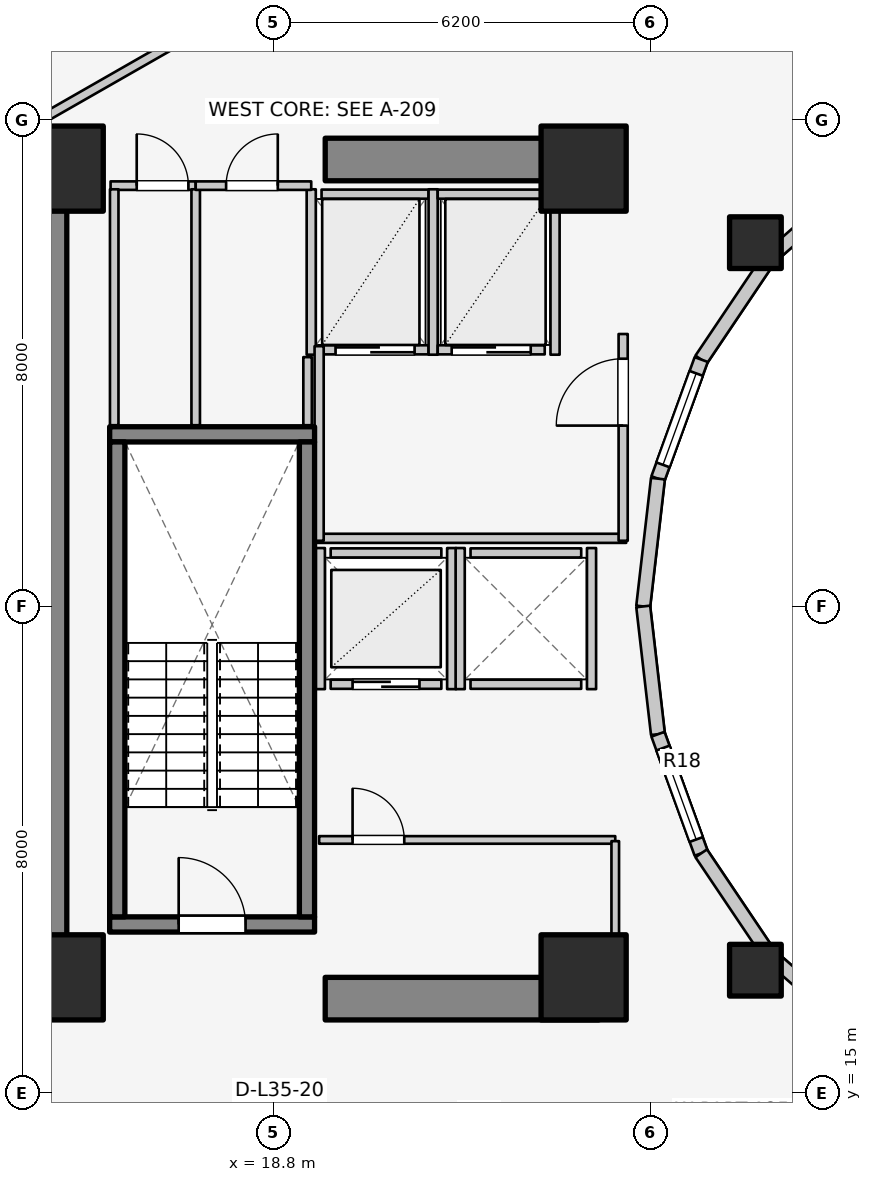
"""IFC4 building model, lengths in metres.
Left out: names, types, materials, properties, quantities, classifications, styles, units other than length and angle.
Written with IfcOpenShell. Run it as: python <this file> out.ifc"""

import sys

from ifc_helpers import new_model, si_unit, direction, frame, frame_2d, origin, origin_2d, place, context, subcontext, project, spatial, rectangle, extrude, element, fill, save


model = new_model("IFC4")
c1 = context("Model", 3, precision=1e-05, world=origin(), true_north=direction((0.0, 1.0)))
c2 = subcontext(c1, "Body", "Model", "MODEL_VIEW")
j1 = project(units=[si_unit("LENGTHUNIT", "METRE"), si_unit("PLANEANGLEUNIT", "RADIAN")], contexts=[c1])
p1 = place(None, origin())
s1 = spatial("IfcSite", under=j1, at=p1, CompositionType="ELEMENT")
p2 = place(p1, origin())
s2 = spatial("IfcBuilding", under=s1, at=p2, CompositionType="ELEMENT")
p3 = place(p2, frame((0.0, 0.0, 116.6)))
s3 = spatial("IfcBuildingStorey", under=s2, at=p3, CompositionType="ELEMENT", Elevation=116.6)
p4 = place(p3, frame((15.05, 17.05, 0.0), z_axis=(0.0, 0.0, 1.0), x_axis=(0.0, 1.0, 0.0)))
e1 = element("IfcWall", 1, at=p4, inside=s3, PredefinedType="SHEAR", context=c2, shape_type="SweptSolid", body=[
    extrude(rectangle(XDim=12.8, YDim=0.7, at=frame_2d((6.4, 0.0))), origin(), (0.0, 0.0, 1.0), 3.1),
])
for number, where, z_axis, x_axis in (
    (2, (19.65, 16.55, 0.0), (0.0, 0.0, 1.0), (1.0, 0.0, 0.0)),
    (3, (19.65, 30.35, 0.0), (0.0, 0.0, 1.0), (1.0, 0.0, 0.0)),
):
    element("IfcWall", number, at=place(p3, frame(where, z_axis=z_axis, x_axis=x_axis)), inside=s3, PredefinedType="SHEAR", context=c2, shape_type="SweptSolid", body=[
        extrude(rectangle(XDim=4.5, YDim=0.7, at=frame_2d((2.25, 0.0))), origin(), (0.0, 0.0, 1.0), 3.1),
    ])
p5 = place(p3, frame((16.105, 17.77, 0.0), z_axis=(0.0, 0.0, 1.0), x_axis=(1.0, 0.0, 0.0)))
e4 = element("IfcWall", 4, at=p5, inside=s3, PredefinedType="SOLIDWALL", context=c2, shape_type="SweptSolid", body=[
    extrude(rectangle(XDim=3.37, YDim=0.25, at=frame_2d((1.685, 0.0))), origin(), (0.0, 0.0, 1.0), 3.1),
])
p6 = place(p5, frame((1.135, 0.0, 0.0)))
e5 = element("IfcOpeningElement", 5, at=p6, cuts=e4, PredefinedType="OPENING", context=c2, shape_type="SweptSolid", body=[
    extrude(rectangle(XDim=1.1, YDim=2.1, at=frame_2d((0.55, 1.05))), frame((0.0, 0.135, 0.0), z_axis=(0.0, -1.0, 0.0), x_axis=(1.0, 0.0, 0.0)), (0.0, 0.0, 1.0), 0.27),
])
p7 = place(p3, frame((16.105, 25.83, 0.0), z_axis=(0.0, 0.0, 1.0), x_axis=(1.0, 0.0, 0.0)))
e6 = element("IfcWall", 6, at=p7, inside=s3, PredefinedType="SOLIDWALL", context=c2, shape_type="SweptSolid", body=[
    extrude(rectangle(XDim=3.37, YDim=0.25, at=frame_2d((1.685, 0.0))), origin(), (0.0, 0.0, 1.0), 3.1),
])
for number, where, z_axis, x_axis in (
    (7, (16.23, 17.895, 0.0), (0.0, 0.0, 1.0), (0.0, 1.0, 0.0)),
    (8, (19.35, 17.895, 0.0), (0.0, 0.0, 1.0), (0.0, 1.0, 0.0)),
):
    element("IfcWall", number, at=place(p3, frame(where, z_axis=z_axis, x_axis=x_axis)), inside=s3, PredefinedType="SOLIDWALL", context=c2, shape_type="SweptSolid", body=[
        extrude(rectangle(XDim=7.81, YDim=0.25, at=frame_2d((3.905, 0.0))), origin(), (0.0, 0.0, 1.0), 3.1),
    ])
for number, where, z_axis, x_axis in (
    (9, (15.3, 16.9, 0.0), (0.0, 0.0, 1.0), (1.0, 0.0, 0.0)),
    (10, (23.9, 16.9, 0.0), (0.0, 0.0, 1.0), (1.0, 0.0, 0.0)),
    (11, (23.9, 30.2, 0.0), (0.0, 0.0, 1.0), (1.0, 0.0, 0.0)),
    (12, (15.3, 30.2, 0.0), (0.0, 0.0, 1.0), (1.0, 0.0, 0.0)),
):
    element("IfcColumn", number, at=place(p3, frame(where, z_axis=z_axis, x_axis=x_axis)), inside=s3, PredefinedType="COLUMN", context=c2, shape_type="SweptSolid", body=[
        extrude(rectangle(XDim=1.4, YDim=1.4, at=origin_2d()), origin(), (0.0, 0.0, 1.0), 3.1),
    ])
for number, where, z_axis, x_axis in (
    (13, (26.725, 28.982, 0.0), (0.0, 0.0, 1.0), (1.0, 0.0, 0.0)),
    (14, (26.725, 17.018, 0.0), (0.0, 0.0, 1.0), (1.0, 0.0, 0.0)),
):
    element("IfcColumn", number, at=place(p3, frame(where, z_axis=z_axis, x_axis=x_axis)), inside=s3, PredefinedType="COLUMN", context=c2, shape_type="SweptSolid", body=[
        extrude(rectangle(XDim=0.85, YDim=0.85, at=origin_2d()), origin(), (0.0, 0.0, 1.0), 3.1),
    ])
p8 = place(p3, frame((28.44, 30.032, 0.0), z_axis=(0.0, 0.0, 1.0), x_axis=(-0.752576694707, -0.658504607869, 0.0)))
e15 = element("IfcWall", 15, at=p8, inside=s3, PredefinedType="STANDARD", context=c2, shape_type="SweptSolid", body=[
    extrude(rectangle(XDim=1.959, YDim=0.23, at=frame_2d((0.98, 0.0))), origin(), (0.0, 0.0, 1.0), 2.16),
])
p9 = place(p3, frame((26.965, 28.742, 0.0), z_axis=(0.0, 0.0, 1.0), x_axis=(-0.558197800898, -0.829707909492, 0.0)))
e16 = element("IfcWall", 16, at=p9, inside=s3, PredefinedType="STANDARD", context=c2, shape_type="SweptSolid", body=[
    extrude(rectangle(XDim=2.027, YDim=0.23, at=frame_2d((1.013, 0.0))), origin(), (0.0, 0.0, 1.0), 2.16),
])
p10 = place(p3, frame((25.834, 27.06, 0.0), z_axis=(0.0, 0.0, 1.0), x_axis=(-0.341423187295, -0.93990968033, 0.0)))
e17 = element("IfcWall", 17, at=p10, inside=s3, PredefinedType="STANDARD", context=c2, shape_type="SweptSolid", body=[
    extrude(rectangle(XDim=2.084, YDim=0.23, at=frame_2d((1.042, 0.0))), origin(), (0.0, 0.0, 1.0), 2.84),
])
p11 = place(p10, frame((0.242, 0.0, 0.85)))
e18 = element("IfcOpeningElement", 18, at=p11, cuts=e17, PredefinedType="OPENING", context=c2, shape_type="SweptSolid", body=[
    extrude(rectangle(XDim=1.6, YDim=1.65, at=frame_2d((0.8, 0.825))), frame((0.0, 0.125, 0.0), z_axis=(0.0, -1.0, 0.0), x_axis=(1.0, 0.0, 0.0)), (0.0, 0.0, 1.0), 0.25),
])
for number, where, z_axis, x_axis in (
    (19, (25.123, 25.102, 0.0), (0.0, 0.0, 1.0), (-0.115, -0.993, 0.0)),
    (20, (24.88, 23.0, 0.0), (0.0, 0.0, 1.0), (0.115, -0.993, 0.0)),
):
    element("IfcWall", number, at=place(p3, frame(where, z_axis=z_axis, x_axis=x_axis)), inside=s3, PredefinedType="STANDARD", context=c2, shape_type="SweptSolid", body=[
        extrude(rectangle(XDim=2.115, YDim=0.23, at=frame_2d((1.058, 0.0))), origin(), (0.0, 0.0, 1.0), 2.84),
    ])
p12 = place(p3, frame((25.123, 20.898, 0.0), z_axis=(0.0, 0.0, 1.0), x_axis=(0.341423187295, -0.93990968033, 0.0)))
e21 = element("IfcWall", 21, at=p12, inside=s3, PredefinedType="STANDARD", context=c2, shape_type="SweptSolid", body=[
    extrude(rectangle(XDim=2.084, YDim=0.23, at=frame_2d((1.042, 0.0))), origin(), (0.0, 0.0, 1.0), 2.84),
])
p13 = place(p12, frame((0.242, 0.0, 0.85)))
e22 = element("IfcOpeningElement", 22, at=p13, cuts=e21, PredefinedType="OPENING", context=c2, shape_type="SweptSolid", body=[
    extrude(rectangle(XDim=1.6, YDim=1.65, at=frame_2d((0.8, 0.825))), frame((0.0, 0.125, 0.0), z_axis=(0.0, -1.0, 0.0), x_axis=(1.0, 0.0, 0.0)), (0.0, 0.0, 1.0), 0.25),
])
p14 = place(p3, frame((25.834, 18.94, 0.0), z_axis=(0.0, 0.0, 1.0), x_axis=(0.558197800898, -0.829707909492, 0.0)))
e23 = element("IfcWall", 23, at=p14, inside=s3, PredefinedType="STANDARD", context=c2, shape_type="SweptSolid", body=[
    extrude(rectangle(XDim=2.027, YDim=0.23, at=frame_2d((1.013, 0.0))), origin(), (0.0, 0.0, 1.0), 2.16),
])
p15 = place(p3, frame((26.965, 17.258, 0.0), z_axis=(0.0, 0.0, 1.0), x_axis=(0.752576694707, -0.658504607869, 0.0)))
e24 = element("IfcWall", 24, at=p15, inside=s3, PredefinedType="STANDARD", context=c2, shape_type="SweptSolid", body=[
    extrude(rectangle(XDim=1.959, YDim=0.23, at=frame_2d((0.98, 0.0))), origin(), (0.0, 0.0, 1.0), 2.16),
])
p16 = place(p3, frame((19.74, 21.72, 0.0), z_axis=(0.0, 0.0, 1.0), x_axis=(1.0, 0.0, 0.0)))
e25 = element("IfcWall", 25, at=p16, inside=s3, PredefinedType="SOLIDWALL", context=c2, shape_type="SweptSolid", body=[
    extrude(rectangle(XDim=1.82, YDim=0.15, at=frame_2d((0.91, 0.0))), origin(), (0.0, 0.0, 1.0), 2.855),
])
p17 = place(p16, frame((0.36, 0.0, 0.0)))
e26 = element("IfcOpeningElement", 26, at=p17, cuts=e25, PredefinedType="OPENING", context=c2, shape_type="SweptSolid", body=[
    extrude(rectangle(XDim=1.1, YDim=2.1, at=frame_2d((0.55, 1.05))), frame((0.0, 0.085, 0.0), z_axis=(0.0, -1.0, 0.0), x_axis=(1.0, 0.0, 0.0)), (0.0, 0.0, 1.0), 0.17),
])
p18 = place(p3, frame((19.74, 23.88, 0.0), z_axis=(0.0, 0.0, 1.0), x_axis=(1.0, 0.0, 0.0)))
e27 = element("IfcWall", 27, at=p18, inside=s3, PredefinedType="SOLIDWALL", context=c2, shape_type="SweptSolid", body=[
    extrude(rectangle(XDim=1.82, YDim=0.15, at=frame_2d((0.91, 0.0))), origin(), (0.0, 0.0, 1.0), 2.855),
])
for number, where, z_axis, x_axis in (
    (28, (19.57, 21.64, 0.0), (0.0, 0.0, 1.0), (0.0, 1.0, 0.0)),
    (29, (21.73, 21.64, 0.0), (0.0, 0.0, 1.0), (0.0, 1.0, 0.0)),
):
    element("IfcWall", number, at=place(p3, frame(where, z_axis=z_axis, x_axis=x_axis)), inside=s3, PredefinedType="SOLIDWALL", context=c2, shape_type="SweptSolid", body=[
        extrude(rectangle(XDim=2.32, YDim=0.15, at=frame_2d((1.16, 0.0))), origin(), (0.0, 0.0, 1.0), 2.855),
    ])
for number, where, z_axis, x_axis in (
    (30, (22.04, 21.72, 0.0), (0.0, 0.0, 1.0), (1.0, 0.0, 0.0)),
    (31, (22.04, 23.88, 0.0), (0.0, 0.0, 1.0), (1.0, 0.0, 0.0)),
):
    element("IfcWall", number, at=place(p3, frame(where, z_axis=z_axis, x_axis=x_axis)), inside=s3, PredefinedType="SOLIDWALL", context=c2, shape_type="SweptSolid", body=[
        extrude(rectangle(XDim=1.82, YDim=0.15, at=frame_2d((0.91, 0.0))), origin(), (0.0, 0.0, 1.0), 2.12),
    ])
p19 = place(p3, frame((21.87, 21.64, 0.0), z_axis=(0.0, 0.0, 1.0), x_axis=(0.0, 1.0, 0.0)))
e32 = element("IfcWall", 32, at=p19, inside=s3, PredefinedType="SOLIDWALL", context=c2, shape_type="SweptSolid", body=[
    extrude(rectangle(XDim=2.32, YDim=0.15, at=frame_2d((1.16, 0.0))), origin(), (0.0, 0.0, 1.0), 2.855),
])
p20 = place(p3, frame((24.03, 21.64, 0.0), z_axis=(0.0, 0.0, 1.0), x_axis=(0.0, 1.0, 0.0)))
e33 = element("IfcWall", 33, at=p20, inside=s3, PredefinedType="SOLIDWALL", context=c2, shape_type="SweptSolid", body=[
    extrude(rectangle(XDim=2.32, YDim=0.15, at=frame_2d((1.16, 0.0))), origin(), (0.0, 0.0, 1.0), 2.12),
])
p21 = place(p3, frame((19.59, 27.22, 0.0), z_axis=(0.0, 0.0, 1.0), x_axis=(1.0, 0.0, 0.0)))
e34 = element("IfcWall", 34, at=p21, inside=s3, PredefinedType="SOLIDWALL", context=c2, shape_type="SweptSolid", body=[
    extrude(rectangle(XDim=1.76, YDim=0.15, at=frame_2d((0.88, 0.0))), origin(), (0.0, 0.0, 1.0), 2.855),
])
p22 = place(p21, frame((0.23, 0.0, 0.0)))
e35 = element("IfcOpeningElement", 35, at=p22, cuts=e34, PredefinedType="OPENING", context=c2, shape_type="SweptSolid", body=[
    extrude(rectangle(XDim=1.3, YDim=2.1, at=frame_2d((0.65, 1.05))), frame((0.0, 0.085, 0.0), z_axis=(0.0, -1.0, 0.0), x_axis=(1.0, 0.0, 0.0)), (0.0, 0.0, 1.0), 0.17),
])
p23 = place(p3, frame((19.59, 29.78, 0.0), z_axis=(0.0, 0.0, 1.0), x_axis=(1.0, 0.0, 0.0)))
e36 = element("IfcWall", 36, at=p23, inside=s3, PredefinedType="SOLIDWALL", context=c2, shape_type="SweptSolid", body=[
    extrude(rectangle(XDim=1.76, YDim=0.15, at=frame_2d((0.88, 0.0))), origin(), (0.0, 0.0, 1.0), 2.855),
])
for number, where, z_axis, x_axis in (
    (37, (19.42, 27.14, 0.0), (0.0, 0.0, 1.0), (0.0, 1.0, 0.0)),
    (38, (21.425, 27.14, 0.0), (0.0, 0.0, 1.0), (0.0, 1.0, 0.0)),
):
    element("IfcWall", number, at=place(p3, frame(where, z_axis=z_axis, x_axis=x_axis)), inside=s3, PredefinedType="SOLIDWALL", context=c2, shape_type="SweptSolid", body=[
        extrude(rectangle(XDim=2.72, YDim=0.15, at=frame_2d((1.36, 0.0))), origin(), (0.0, 0.0, 1.0), 2.855),
    ])
p24 = place(p3, frame((21.5, 27.22, 0.0), z_axis=(0.0, 0.0, 1.0), x_axis=(1.0, 0.0, 0.0)))
e39 = element("IfcWall", 39, at=p24, inside=s3, PredefinedType="SOLIDWALL", context=c2, shape_type="SweptSolid", body=[
    extrude(rectangle(XDim=1.76, YDim=0.15, at=frame_2d((0.88, 0.0))), origin(), (0.0, 0.0, 1.0), 2.855),
])
p25 = place(p24, frame((0.23, 0.0, 0.0)))
e40 = element("IfcOpeningElement", 40, at=p25, cuts=e39, PredefinedType="OPENING", context=c2, shape_type="SweptSolid", body=[
    extrude(rectangle(XDim=1.3, YDim=2.1, at=frame_2d((0.65, 1.05))), frame((0.0, 0.085, 0.0), z_axis=(0.0, -1.0, 0.0), x_axis=(1.0, 0.0, 0.0)), (0.0, 0.0, 1.0), 0.17),
])
p26 = place(p3, frame((21.5, 29.78, 0.0), z_axis=(0.0, 0.0, 1.0), x_axis=(1.0, 0.0, 0.0)))
e41 = element("IfcWall", 41, at=p26, inside=s3, PredefinedType="SOLIDWALL", context=c2, shape_type="SweptSolid", body=[
    extrude(rectangle(XDim=1.76, YDim=0.15, at=frame_2d((0.88, 0.0))), origin(), (0.0, 0.0, 1.0), 2.855),
])
p27 = place(p3, frame((23.43, 27.14, 0.0), z_axis=(0.0, 0.0, 1.0), x_axis=(0.0, 1.0, 0.0)))
e42 = element("IfcWall", 42, at=p27, inside=s3, PredefinedType="SOLIDWALL", context=c2, shape_type="SweptSolid", body=[
    extrude(rectangle(XDim=2.72, YDim=0.15, at=frame_2d((1.36, 0.0))), origin(), (0.0, 0.0, 1.0), 2.855),
])
p28 = place(p3, frame((19.52, 24.12, 0.0), z_axis=(0.0, 0.0, 1.0), x_axis=(1.0, 0.0, 0.0)))
e43 = element("IfcWall", 43, at=p28, inside=s3, PredefinedType="PARTITIONING", context=c2, shape_type="SweptSolid", body=[
    extrude(rectangle(XDim=5.08, YDim=0.15, at=frame_2d((2.54, 0.0))), origin(), (0.0, 0.0, 1.0), 2.12),
])
p29 = place(p3, frame((19.55, 24.08, 0.0), z_axis=(0.0, 0.0, 1.0), x_axis=(0.0, 1.0, 0.0)))
e44 = element("IfcWall", 44, at=p29, inside=s3, PredefinedType="PARTITIONING", context=c2, shape_type="SweptSolid", body=[
    extrude(rectangle(XDim=3.2, YDim=0.15, at=frame_2d((1.6, 0.0))), origin(), (0.0, 0.0, 1.0), 2.855),
])
p30 = place(p3, frame((24.55, 24.08, 0.0), z_axis=(0.0, 0.0, 1.0), x_axis=(0.0, 1.0, 0.0)))
e45 = element("IfcWall", 45, at=p30, inside=s3, PredefinedType="PARTITIONING", context=c2, shape_type="SweptSolid", body=[
    extrude(rectangle(XDim=3.4, YDim=0.15, at=frame_2d((1.7, 0.0))), origin(), (0.0, 0.0, 1.0), 2.855),
])
p31 = place(p30, frame((1.894, 0.0, 0.0)))
e46 = element("IfcOpeningElement", 46, at=p31, cuts=e45, PredefinedType="OPENING", context=c2, shape_type="SweptSolid", body=[
    extrude(rectangle(XDim=1.1, YDim=2.1, at=frame_2d((0.55, 1.05))), frame((0.0, 0.085, 0.0), z_axis=(0.0, -1.0, 0.0), x_axis=(1.0, 0.0, 0.0)), (0.0, 0.0, 1.0), 0.17),
])
p32 = place(p3, frame((19.55, 19.16, 0.0), z_axis=(0.0, 0.0, 1.0), x_axis=(1.0, 0.0, 0.0)))
e47 = element("IfcWall", 47, at=p32, inside=s3, PredefinedType="PARTITIONING", context=c2, shape_type="SweptSolid", body=[
    extrude(rectangle(XDim=4.87, YDim=0.125, at=frame_2d((2.435, 0.0))), origin(), (0.0, 0.0, 1.0), 2.12),
])
p33 = place(p32, frame((0.55, 0.0, 0.0)))
e48 = element("IfcOpeningElement", 48, at=p33, cuts=e47, PredefinedType="OPENING", context=c2, shape_type="SweptSolid", body=[
    extrude(rectangle(XDim=0.85, YDim=2.05, at=frame_2d((0.425, 1.025))), frame((0.0, 0.073, 0.0), z_axis=(0.0, -1.0, 0.0), x_axis=(1.0, 0.0, 0.0)), (0.0, 0.0, 1.0), 0.145),
])
p34 = place(p3, frame((24.42, 17.1, 0.0), z_axis=(0.0, 0.0, 1.0), x_axis=(0.0, 1.0, 0.0)))
e49 = element("IfcWall", 49, at=p34, inside=s3, PredefinedType="PARTITIONING", context=c2, shape_type="SweptSolid", body=[
    extrude(rectangle(XDim=2.04, YDim=0.125, at=frame_2d((1.02, 0.0))), origin(), (0.0, 0.0, 1.0), 2.153),
])
p35 = place(p3, frame((16.12, 29.92, 0.0), z_axis=(0.0, 0.0, 1.0), x_axis=(1.0, 0.0, 0.0)))
e50 = element("IfcWall", 50, at=p35, inside=s3, PredefinedType="PLUMBINGWALL", context=c2, shape_type="SweptSolid", body=[
    extrude(rectangle(XDim=1.4, YDim=0.14, at=frame_2d((0.7, 0.0))), origin(), (0.0, 0.0, 1.0), 2.855),
])
p36 = place(p35, frame((0.43, 0.0, 0.0)))
e51 = element("IfcOpeningElement", 51, at=p36, cuts=e50, PredefinedType="OPENING", context=c2, shape_type="SweptSolid", body=[
    extrude(rectangle(XDim=0.85, YDim=2.05, at=frame_2d((0.425, 1.025))), frame((0.0, 0.08, 0.0), z_axis=(0.0, -1.0, 0.0), x_axis=(1.0, 0.0, 0.0)), (0.0, 0.0, 1.0), 0.16),
])
for number, where, z_axis, x_axis in (
    (52, (16.18, 25.98, 0.0), (0.0, 0.0, 1.0), (0.0, 1.0, 0.0)),
    (53, (17.52, 25.98, 0.0), (0.0, 0.0, 1.0), (0.0, 1.0, 0.0)),
):
    element("IfcWall", number, at=place(p3, frame(where, z_axis=z_axis, x_axis=x_axis)), inside=s3, PredefinedType="PLUMBINGWALL", context=c2, shape_type="SweptSolid", body=[
        extrude(rectangle(XDim=3.88, YDim=0.14, at=frame_2d((1.94, 0.0))), origin(), (0.0, 0.0, 1.0), 2.855),
    ])
p37 = place(p3, frame((17.52, 29.92, 0.0), z_axis=(0.0, 0.0, 1.0), x_axis=(1.0, 0.0, 0.0)))
e54 = element("IfcWall", 54, at=p37, inside=s3, PredefinedType="PLUMBINGWALL", context=c2, shape_type="SweptSolid", body=[
    extrude(rectangle(XDim=1.9, YDim=0.14, at=frame_2d((0.95, 0.0))), origin(), (0.0, 0.0, 1.0), 2.855),
])
p38 = place(p37, frame((0.5, 0.0, 0.0)))
e55 = element("IfcOpeningElement", 55, at=p38, cuts=e54, PredefinedType="OPENING", context=c2, shape_type="SweptSolid", body=[
    extrude(rectangle(XDim=0.85, YDim=2.05, at=frame_2d((0.425, 1.025))), frame((0.0, 0.08, 0.0), z_axis=(0.0, -1.0, 0.0), x_axis=(1.0, 0.0, 0.0)), (0.0, 0.0, 1.0), 0.16),
])
p39 = place(p3, frame((19.36, 25.98, 0.0), z_axis=(0.0, 0.0, 1.0), x_axis=(0.0, 1.0, 0.0)))
e56 = element("IfcWall", 56, at=p39, inside=s3, PredefinedType="PLUMBINGWALL", context=c2, shape_type="SweptSolid", body=[
    extrude(rectangle(XDim=1.12, YDim=0.14, at=frame_2d((0.56, 0.0))), origin(), (0.0, 0.0, 1.0), 2.855),
])
p40 = place(p3, frame((17.243, 32.305, 0.0), z_axis=(0.0, 0.0, 1.0), x_axis=(-0.867991349648, -0.496579315857, 0.0)))
e57 = element("IfcWall", 57, at=p40, inside=s3, PredefinedType="PARTITIONING", context=c2, shape_type="SweptSolid", body=[
    extrude(rectangle(XDim=2.567, YDim=0.15, at=frame_2d((1.283, 0.0))), origin(), (0.0, 0.0, 1.0), 2.142),
])
p41 = place(p3, frame((28.45, 15.985, 0.0), z_axis=(0.0, 0.0, 1.0), x_axis=(-0.524565340045, -0.851370192116, 0.0)))
e58 = element("IfcWall", 58, at=p41, inside=s3, PredefinedType="PARTITIONING", context=c2, shape_type="SweptSolid", body=[
    extrude(rectangle(XDim=3.027, YDim=0.125, at=frame_2d((1.514, 0.0))), origin(), (0.0, 0.0, 1.0), 2.272),
])
p42 = place(p11, origin())
e59 = element("IfcWindow", 59, at=p42, inside=s3, PartitioningType="SINGLE_PANEL", PredefinedType="WINDOW", context=c2, shape_type="SweptSolid", body=[
    extrude(rectangle(XDim=1.6, YDim=1.65, at=frame_2d((0.8, 0.825))), frame((0.0, 0.03, 0.0), z_axis=(0.0, -1.0, 0.0), x_axis=(1.0, 0.0, 0.0)), (0.0, 0.0, 1.0), 0.06),
])
fill(e18, e59)
p43 = place(p13, origin())
e60 = element("IfcWindow", 60, at=p43, inside=s3, PartitioningType="SINGLE_PANEL", PredefinedType="WINDOW", context=c2, shape_type="SweptSolid", body=[
    extrude(rectangle(XDim=1.6, YDim=1.65, at=frame_2d((0.8, 0.825))), frame((0.0, 0.03, 0.0), z_axis=(0.0, -1.0, 0.0), x_axis=(1.0, 0.0, 0.0)), (0.0, 0.0, 1.0), 0.06),
])
fill(e22, e60)
p44 = place(p6, origin())
e61 = element("IfcDoor", 61, at=p44, inside=s3, OperationType="SINGLE_SWING_LEFT", PredefinedType="DOOR", context=c2, shape_type="SweptSolid", body=[
    extrude(rectangle(XDim=1.1, YDim=2.1, at=frame_2d((0.55, 1.05))), frame((0.0, 0.025, 0.0), z_axis=(0.0, -1.0, 0.0), x_axis=(1.0, 0.0, 0.0)), (0.0, 0.0, 1.0), 0.05),
])
fill(e5, e61)
p45 = place(p17, origin())
e62 = element("IfcDoor", 62, at=p45, inside=s3, OperationType="DOUBLE_DOOR_SLIDING", PredefinedType="DOOR", context=c2, shape_type="SweptSolid", body=[
    extrude(rectangle(XDim=1.1, YDim=2.1, at=frame_2d((0.55, 1.05))), frame((0.0, 0.025, 0.0), z_axis=(0.0, -1.0, 0.0), x_axis=(1.0, 0.0, 0.0)), (0.0, 0.0, 1.0), 0.05),
])
fill(e26, e62)
p46 = place(p22, origin())
e63 = element("IfcDoor", 63, at=p46, inside=s3, OperationType="DOUBLE_DOOR_SLIDING", PredefinedType="DOOR", context=c2, shape_type="SweptSolid", body=[
    extrude(rectangle(XDim=1.3, YDim=2.1, at=frame_2d((0.65, 1.05))), frame((0.0, 0.025, 0.0), z_axis=(0.0, -1.0, 0.0), x_axis=(1.0, 0.0, 0.0)), (0.0, 0.0, 1.0), 0.05),
])
fill(e35, e63)
p47 = place(p25, origin())
e64 = element("IfcDoor", 64, at=p47, inside=s3, OperationType="DOUBLE_DOOR_SLIDING", PredefinedType="DOOR", context=c2, shape_type="SweptSolid", body=[
    extrude(rectangle(XDim=1.3, YDim=2.1, at=frame_2d((0.65, 1.05))), frame((0.0, 0.025, 0.0), z_axis=(0.0, -1.0, 0.0), x_axis=(1.0, 0.0, 0.0)), (0.0, 0.0, 1.0), 0.05),
])
fill(e40, e64)
p48 = place(p31, origin())
e65 = element("IfcDoor", 65, at=p48, inside=s3, OperationType="SINGLE_SWING_LEFT", PredefinedType="DOOR", context=c2, shape_type="SweptSolid", body=[
    extrude(rectangle(XDim=1.1, YDim=2.1, at=frame_2d((0.55, 1.05))), frame((0.0, 0.025, 0.0), z_axis=(0.0, -1.0, 0.0), x_axis=(1.0, 0.0, 0.0)), (0.0, 0.0, 1.0), 0.05),
])
fill(e46, e65)
p49 = place(p33, origin())
e66 = element("IfcDoor", 66, at=p49, inside=s3, OperationType="SINGLE_SWING_LEFT", PredefinedType="DOOR", context=c2, shape_type="SweptSolid", body=[
    extrude(rectangle(XDim=0.85, YDim=2.05, at=frame_2d((0.425, 1.025))), frame((0.0, 0.025, 0.0), z_axis=(0.0, -1.0, 0.0), x_axis=(1.0, 0.0, 0.0)), (0.0, 0.0, 1.0), 0.05),
])
fill(e48, e66)
p50 = place(p36, origin())
e67 = element("IfcDoor", 67, at=p50, inside=s3, OperationType="SINGLE_SWING_LEFT", PredefinedType="DOOR", context=c2, shape_type="SweptSolid", body=[
    extrude(rectangle(XDim=0.85, YDim=2.05, at=frame_2d((0.425, 1.025))), frame((0.0, 0.025, 0.0), z_axis=(0.0, -1.0, 0.0), x_axis=(1.0, 0.0, 0.0)), (0.0, 0.0, 1.0), 0.05),
])
fill(e51, e67)
p51 = place(p38, origin())
e68 = element("IfcDoor", 68, at=p51, inside=s3, OperationType="SINGLE_SWING_RIGHT", PredefinedType="DOOR", context=c2, shape_type="SweptSolid", body=[
    extrude(rectangle(XDim=0.85, YDim=2.05, at=frame_2d((0.425, 1.025))), frame((0.0, 0.025, 0.0), z_axis=(0.0, -1.0, 0.0), x_axis=(1.0, 0.0, 0.0)), (0.0, 0.0, 1.0), 0.05),
])
fill(e55, e68)
save(model, sys.argv[1])
